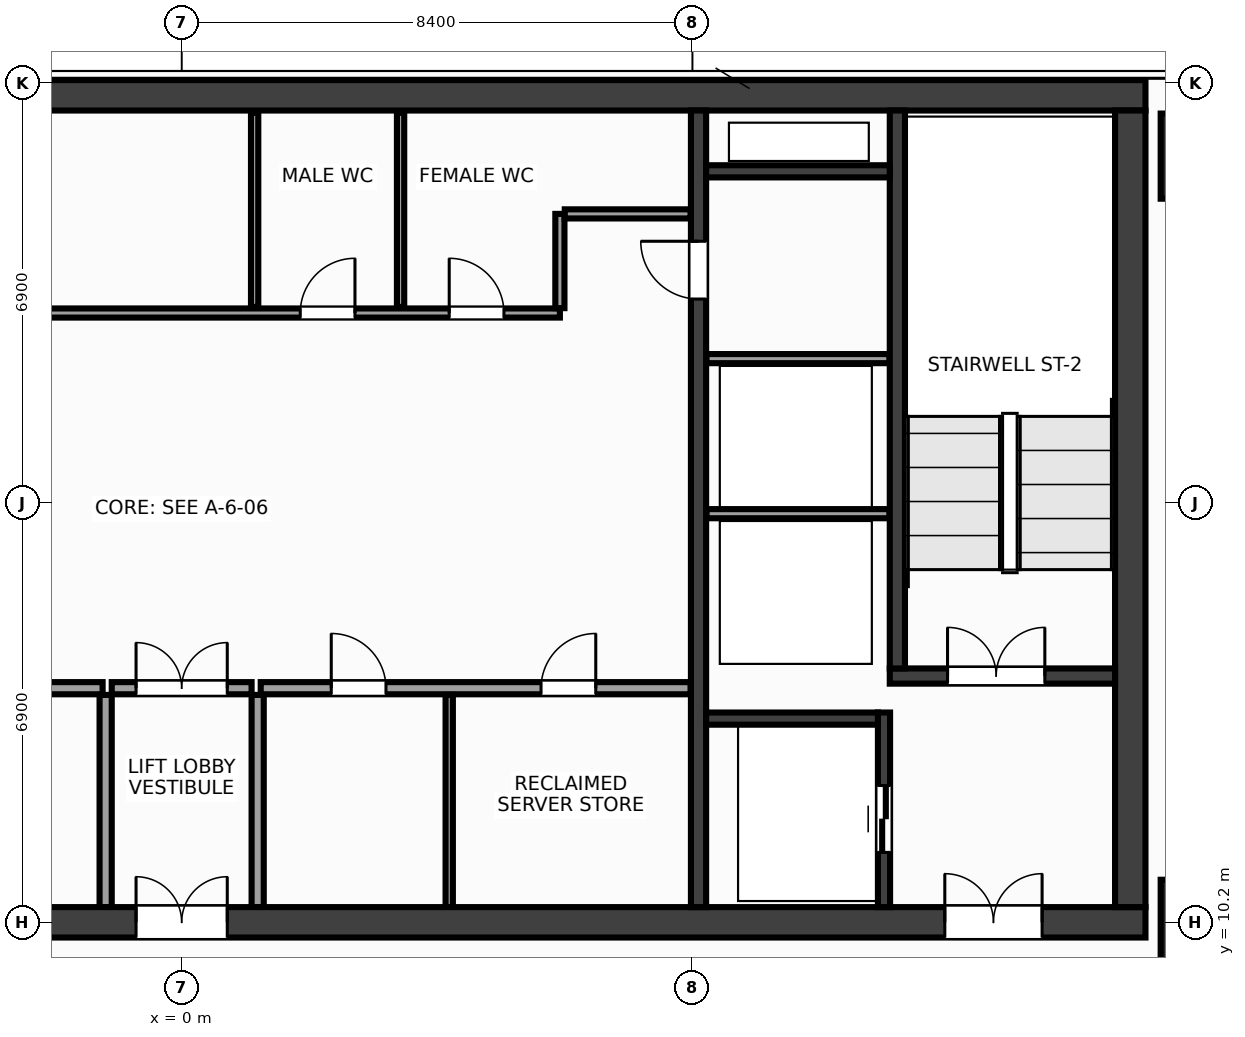
"""IFC4 building model, lengths in metres.
Left out: names, types, materials, properties, quantities, classifications, styles, units other than length and angle.
Written with IfcOpenShell. Run it as: python <this file> out.ifc"""

import sys

from ifc_helpers import new_model, si_unit, direction, frame, frame_2d, origin, origin_2d, place, context, subcontext, project, spatial, rectangle, extrude, source, transform, mapped, element, fill, save


model = new_model("IFC4")
c1 = context("Model", 3, precision=1e-05, world=origin(), true_north=direction((0.0, 1.0)))
c2 = subcontext(c1, "Body", "Model", "MODEL_VIEW")
j1 = project(units=[si_unit("LENGTHUNIT", "METRE"), si_unit("PLANEANGLEUNIT", "RADIAN")], contexts=[c1])
p1 = place(None, origin())
s1 = spatial("IfcSite", under=j1, at=p1, CompositionType="ELEMENT")
p2 = place(p1, origin())
s2 = spatial("IfcBuilding", under=s1, at=p2, CompositionType="ELEMENT")
p3 = place(p2, frame((0.0, 0.0, 243.2)))
s3 = spatial("IfcBuildingStorey", under=s2, at=p3, CompositionType="ELEMENT", Elevation=243.2)
m1 = source(origin(), c2, "Body", "SweptSolid", [
    extrude(rectangle(XDim=31.7, YDim=0.5, at=frame_2d((15.85, 0.0))), origin(), (0.0, 0.0, 1.0), 3.6),
])
p4 = place(p3, frame((-15.85, 23.8, 0.0), z_axis=(0.0, 0.0, 1.0), x_axis=(1.0, 0.0, 0.0)))
e1 = element("IfcWall", 1, at=p4, inside=s3, PredefinedType="SHEAR", context=c2, shape_type="MappedRepresentation", body=[
    mapped(m1, transform((0.0, 0.0, 0.0), x_axis=(1.0, 0.0, 0.0), y_axis=(0.0, 1.0, 0.0), z_axis=(0.0, 0.0, 1.0), scale=1.0)),
])
p5 = place(p3, frame((-15.85, 10.2, 0.0), z_axis=(0.0, 0.0, 1.0), x_axis=(1.0, 0.0, 0.0)))
e2 = element("IfcWall", 2, at=p5, inside=s3, PredefinedType="SHEAR", context=c2, shape_type="MappedRepresentation", body=[
    mapped(m1, transform((0.0, 0.0, 0.0), x_axis=(1.0, 0.0, 0.0), y_axis=(0.0, 1.0, 0.0), z_axis=(0.0, 0.0, 1.0), scale=1.0)),
])
p6 = place(p5, frame((1.7, 0.0, 0.0)))
e3 = element("IfcOpeningElement", 3, at=p6, cuts=e2, PredefinedType="OPENING", context=c2, shape_type="SweptSolid", body=[
    extrude(rectangle(XDim=1.6, YDim=2.15, at=frame_2d((0.8, 1.075))), frame((0.0, 0.262, 0.0), z_axis=(0.0, -1.0, 0.0), x_axis=(1.0, 0.0, 0.0)), (0.0, 0.0, 1.0), 0.524),
])
p7 = place(p5, frame((28.4, 0.0, 0.0)))
e4 = element("IfcOpeningElement", 4, at=p7, cuts=e2, PredefinedType="OPENING", context=c2, shape_type="SweptSolid", body=[
    extrude(rectangle(XDim=1.6, YDim=2.15, at=frame_2d((0.8, 1.075))), frame((0.0, 0.262, 0.0), z_axis=(0.0, -1.0, 0.0), x_axis=(1.0, 0.0, 0.0)), (0.0, 0.0, 1.0), 0.524),
])
p8 = place(p5, frame((15.1, 0.0, 0.0)))
e5 = element("IfcOpeningElement", 5, at=p8, cuts=e2, PredefinedType="OPENING", context=c2, shape_type="SweptSolid", body=[
    extrude(rectangle(XDim=1.5, YDim=2.2, at=frame_2d((0.75, 1.1))), frame((0.0, 0.262, 0.0), z_axis=(0.0, -1.0, 0.0), x_axis=(1.0, 0.0, 0.0)), (0.0, 0.0, 1.0), 0.524),
])
m2 = source(origin(), c2, "Body", "SweptSolid", [
    extrude(rectangle(XDim=13.1, YDim=0.5, at=frame_2d((6.55, 0.0))), origin(), (0.0, 0.0, 1.0), 3.6),
])
p9 = place(p3, frame((15.6, 10.45, 0.0), z_axis=(0.0, 0.0, 1.0), x_axis=(0.0, 1.0, 0.0)))
e6 = element("IfcWall", 6, at=p9, inside=s3, PredefinedType="SHEAR", context=c2, shape_type="MappedRepresentation", body=[
    mapped(m2, transform((0.0, 0.0, 0.0), x_axis=(1.0, 0.0, 0.0), y_axis=(0.0, 1.0, 0.0), z_axis=(0.0, 0.0, 1.0), scale=1.0)),
])
m3 = source(origin(), c2, "Body", "SweptSolid", [
    extrude(rectangle(XDim=13.1, YDim=0.25, at=frame_2d((6.55, 0.0))), origin(), (0.0, 0.0, 1.0), 3.6),
])
p10 = place(p3, frame((8.5, 10.45, 0.0), z_axis=(0.0, 0.0, 1.0), x_axis=(0.0, 1.0, 0.0)))
e7 = element("IfcWall", 7, at=p10, inside=s3, PredefinedType="SHEAR", context=c2, shape_type="MappedRepresentation", body=[
    mapped(m3, transform((0.0, 0.0, 0.0), x_axis=(1.0, 0.0, 0.0), y_axis=(0.0, 1.0, 0.0), z_axis=(0.0, 0.0, 1.0), scale=1.0)),
])
p11 = place(p10, frame((10.0, 0.0, 0.0)))
e8 = element("IfcOpeningElement", 8, at=p11, cuts=e7, PredefinedType="OPENING", context=c2, shape_type="SweptSolid", body=[
    extrude(rectangle(XDim=0.95, YDim=2.15, at=frame_2d((0.475, 1.075))), frame((0.0, 0.137, 0.0), z_axis=(0.0, -1.0, 0.0), x_axis=(1.0, 0.0, 0.0)), (0.0, 0.0, 1.0), 0.274),
])
m4 = source(origin(), c2, "Body", "SweptSolid", [
    extrude(rectangle(XDim=3.705, YDim=0.25, at=frame_2d((1.853, 0.0))), origin(), (0.0, 0.0, 1.0), 3.6),
])
p12 = place(p3, frame((11.645, 14.25, 0.0), z_axis=(0.0, 0.0, 1.0), x_axis=(1.0, 0.0, 0.0)))
e9 = element("IfcWall", 9, at=p12, inside=s3, PredefinedType="SHEAR", context=c2, shape_type="MappedRepresentation", body=[
    mapped(m4, transform((0.0, 0.0, 0.0), x_axis=(1.0, 0.0, 0.0), y_axis=(0.0, 1.0, 0.0), z_axis=(0.0, 0.0, 1.0), scale=1.0)),
])
p13 = place(p12, frame((0.95, 0.0, 0.0)))
e10 = element("IfcOpeningElement", 10, at=p13, cuts=e9, PredefinedType="OPENING", context=c2, shape_type="SweptSolid", body=[
    extrude(rectangle(XDim=1.6, YDim=2.15, at=frame_2d((0.8, 1.075))), frame((0.0, 0.137, 0.0), z_axis=(0.0, -1.0, 0.0), x_axis=(1.0, 0.0, 0.0)), (0.0, 0.0, 1.0), 0.274),
])
m5 = source(origin(), c2, "Body", "SweptSolid", [
    extrude(rectangle(XDim=9.175, YDim=0.25, at=frame_2d((4.587, 0.0))), origin(), (0.0, 0.0, 1.0), 3.6),
])
p14 = place(p3, frame((11.77, 14.375, 0.0), z_axis=(0.0, 0.0, 1.0), x_axis=(0.0, 1.0, 0.0)))
e11 = element("IfcWall", 11, at=p14, inside=s3, PredefinedType="SHEAR", context=c2, shape_type="MappedRepresentation", body=[
    mapped(m5, transform((0.0, 0.0, 0.0), x_axis=(1.0, 0.0, 0.0), y_axis=(0.0, 1.0, 0.0), z_axis=(0.0, 0.0, 1.0), scale=1.0)),
])
m6 = source(origin(), c2, "Body", "SweptSolid", [
    extrude(rectangle(XDim=3.2, YDim=0.2, at=frame_2d((1.6, 0.0))), origin(), (0.0, 0.0, 1.0), 3.6),
])
p15 = place(p3, frame((11.55, 10.45, 0.0), z_axis=(0.0, 0.0, 1.0), x_axis=(0.0, 1.0, 0.0)))
e12 = element("IfcWall", 12, at=p15, inside=s3, PredefinedType="SHEAR", context=c2, shape_type="MappedRepresentation", body=[
    mapped(m6, transform((0.0, 0.0, 0.0), x_axis=(1.0, 0.0, 0.0), y_axis=(0.0, 1.0, 0.0), z_axis=(0.0, 0.0, 1.0), scale=1.0)),
])
p16 = place(p15, frame((0.9, 0.0, 0.0)))
e13 = element("IfcOpeningElement", 13, at=p16, cuts=e12, PredefinedType="OPENING", context=c2, shape_type="SweptSolid", body=[
    extrude(rectangle(XDim=1.1, YDim=2.15, at=frame_2d((0.55, 1.075))), frame((0.0, 0.112, 0.0), z_axis=(0.0, -1.0, 0.0), x_axis=(1.0, 0.0, 0.0)), (0.0, 0.0, 1.0), 0.224),
])
m7 = source(origin(), c2, "Body", "SweptSolid", [
    extrude(rectangle(XDim=2.825, YDim=0.2, at=frame_2d((1.413, 0.0))), origin(), (0.0, 0.0, 1.0), 3.6),
])
p17 = place(p3, frame((8.625, 13.55, 0.0), z_axis=(0.0, 0.0, 1.0), x_axis=(1.0, 0.0, 0.0)))
e14 = element("IfcWall", 14, at=p17, inside=s3, PredefinedType="SHEAR", context=c2, shape_type="MappedRepresentation", body=[
    mapped(m7, transform((0.0, 0.0, 0.0), x_axis=(1.0, 0.0, 0.0), y_axis=(0.0, 1.0, 0.0), z_axis=(0.0, 0.0, 1.0), scale=1.0)),
])
m8 = source(origin(), c2, "Body", "SweptSolid", [
    extrude(rectangle(XDim=3.02, YDim=0.2, at=frame_2d((1.51, 0.0))), origin(), (0.0, 0.0, 1.0), 3.6),
])
p18 = place(p3, frame((8.625, 22.55, 0.0), z_axis=(0.0, 0.0, 1.0), x_axis=(1.0, 0.0, 0.0)))
e15 = element("IfcWall", 15, at=p18, inside=s3, PredefinedType="SHEAR", context=c2, shape_type="MappedRepresentation", body=[
    mapped(m8, transform((0.0, 0.0, 0.0), x_axis=(1.0, 0.0, 0.0), y_axis=(0.0, 1.0, 0.0), z_axis=(0.0, 0.0, 1.0), scale=1.0)),
])
m9 = source(origin(), c2, "Body", "SweptSolid", [
    extrude(rectangle(XDim=1.4, YDim=1.4, at=origin_2d()), origin(), (0.0, 0.0, 1.0), 3.6),
])
for number, where, z_axis, x_axis in (
    (16, (16.8, 10.2, 0.0), (0.0, 0.0, 1.0), (1.0, 0.0, 0.0)),
    (17, (16.8, 22.8, 0.0), (0.0, 0.0, 1.0), (1.0, 0.0, 0.0)),
):
    element("IfcColumn", number, at=place(p3, frame(where, z_axis=z_axis, x_axis=x_axis)), inside=s3, PredefinedType="COLUMN", context=c2, shape_type="MappedRepresentation", body=[
        mapped(m9, transform((0.0, 0.0, 0.0), x_axis=(1.0, 0.0, 0.0), y_axis=(0.0, 1.0, 0.0), z_axis=(0.0, 0.0, 1.0), scale=1.0)),
    ])
m10 = source(origin(), c2, "Body", "SweptSolid", [
    extrude(rectangle(XDim=3.01, YDim=0.15, at=frame_2d((1.505, 0.0))), origin(), (0.0, 0.0, 1.0), 3.37),
])
for number, where, z_axis, x_axis in (
    (18, (8.63, 16.92, 0.0), (0.0, 0.0, 1.0), (1.0, 0.0, 0.0)),
    (19, (8.63, 19.47, 0.0), (0.0, 0.0, 1.0), (1.0, 0.0, 0.0)),
):
    element("IfcWall", number, at=place(p3, frame(where, z_axis=z_axis, x_axis=x_axis)), inside=s3, PredefinedType="PARTITIONING", context=c2, shape_type="MappedRepresentation", body=[
        mapped(m10, transform((0.0, 0.0, 0.0), x_axis=(1.0, 0.0, 0.0), y_axis=(0.0, 1.0, 0.0), z_axis=(0.0, 0.0, 1.0), scale=1.0)),
    ])
m11 = source(origin(), c2, "Body", "SweptSolid", [
    extrude(rectangle(XDim=7.07, YDim=0.2, at=frame_2d((3.535, 0.0))), origin(), (0.0, 0.0, 1.0), 3.37),
])
p19 = place(p3, frame((-8.37, 14.05, 0.0), z_axis=(0.0, 0.0, 1.0), x_axis=(1.0, 0.0, 0.0)))
e20 = element("IfcWall", 20, at=p19, inside=s3, PredefinedType="PARTITIONING", context=c2, shape_type="MappedRepresentation", body=[
    mapped(m11, transform((0.0, 0.0, 0.0), x_axis=(1.0, 0.0, 0.0), y_axis=(0.0, 1.0, 0.0), z_axis=(0.0, 0.0, 1.0), scale=1.0)),
])
p20 = place(p19, frame((2.8, 0.0, 0.0)))
e21 = element("IfcOpeningElement", 21, at=p20, cuts=e20, PredefinedType="OPENING", context=c2, shape_type="SweptSolid", body=[
    extrude(rectangle(XDim=0.98, YDim=2.15, at=frame_2d((0.49, 1.075))), frame((0.0, 0.112, 0.0), z_axis=(0.0, -1.0, 0.0), x_axis=(1.0, 0.0, 0.0)), (0.0, 0.0, 1.0), 0.224),
])
p21 = place(p3, frame((1.3, 14.05, 0.0), z_axis=(0.0, 0.0, 1.0), x_axis=(1.0, 0.0, 0.0)))
e22 = element("IfcWall", 22, at=p21, inside=s3, PredefinedType="PARTITIONING", context=c2, shape_type="MappedRepresentation", body=[
    mapped(m11, transform((0.0, 0.0, 0.0), x_axis=(1.0, 0.0, 0.0), y_axis=(0.0, 1.0, 0.0), z_axis=(0.0, 0.0, 1.0), scale=1.0)),
])
p22 = place(p21, frame((1.16, 0.0, 0.0)))
e23 = element("IfcOpeningElement", 23, at=p22, cuts=e22, PredefinedType="OPENING", context=c2, shape_type="SweptSolid", body=[
    extrude(rectangle(XDim=0.9, YDim=2.15, at=frame_2d((0.45, 1.075))), frame((0.0, 0.112, 0.0), z_axis=(0.0, -1.0, 0.0), x_axis=(1.0, 0.0, 0.0)), (0.0, 0.0, 1.0), 0.224),
])
p23 = place(p21, frame((4.61, 0.0, 0.0)))
e24 = element("IfcOpeningElement", 24, at=p23, cuts=e22, PredefinedType="OPENING", context=c2, shape_type="SweptSolid", body=[
    extrude(rectangle(XDim=0.9, YDim=2.15, at=frame_2d((0.45, 1.075))), frame((0.0, 0.112, 0.0), z_axis=(0.0, -1.0, 0.0), x_axis=(1.0, 0.0, 0.0)), (0.0, 0.0, 1.0), 0.224),
])
m12 = source(origin(), c2, "Body", "SweptSolid", [
    extrude(rectangle(XDim=3.49, YDim=0.2, at=frame_2d((1.745, 0.0))), origin(), (0.0, 0.0, 1.0), 3.37),
])
for number, where, z_axis, x_axis in (
    (25, (-1.25, 10.45, 0.0), (0.0, 0.0, 1.0), (0.0, 1.0, 0.0)),
    (26, (1.25, 10.45, 0.0), (0.0, 0.0, 1.0), (0.0, 1.0, 0.0)),
):
    element("IfcWall", number, at=place(p3, frame(where, z_axis=z_axis, x_axis=x_axis)), inside=s3, PredefinedType="PARTITIONING", context=c2, shape_type="MappedRepresentation", body=[
        mapped(m12, transform((0.0, 0.0, 0.0), x_axis=(1.0, 0.0, 0.0), y_axis=(0.0, 1.0, 0.0), z_axis=(0.0, 0.0, 1.0), scale=1.0)),
    ])
m13 = source(origin(), c2, "Body", "SweptSolid", [
    extrude(rectangle(XDim=2.3, YDim=0.2, at=frame_2d((1.15, 0.0))), origin(), (0.0, 0.0, 1.0), 3.37),
])
p24 = place(p3, frame((-1.15, 14.05, 0.0), z_axis=(0.0, 0.0, 1.0), x_axis=(1.0, 0.0, 0.0)))
e27 = element("IfcWall", 27, at=p24, inside=s3, PredefinedType="PARTITIONING", context=c2, shape_type="MappedRepresentation", body=[
    mapped(m13, transform((0.0, 0.0, 0.0), x_axis=(1.0, 0.0, 0.0), y_axis=(0.0, 1.0, 0.0), z_axis=(0.0, 0.0, 1.0), scale=1.0)),
])
p25 = place(p24, frame((0.4, 0.0, 0.0)))
e28 = element("IfcOpeningElement", 28, at=p25, cuts=e27, PredefinedType="OPENING", context=c2, shape_type="SweptSolid", body=[
    extrude(rectangle(XDim=1.5, YDim=2.2, at=frame_2d((0.75, 1.1))), frame((0.0, 0.112, 0.0), z_axis=(0.0, -1.0, 0.0), x_axis=(1.0, 0.0, 0.0)), (0.0, 0.0, 1.0), 0.224),
])
m14 = source(origin(), c2, "Body", "SweptSolid", [
    extrude(rectangle(XDim=14.59, YDim=0.15, at=frame_2d((7.295, 0.0))), origin(), (0.0, 0.0, 1.0), 3.37),
])
p26 = place(p3, frame((-8.37, 20.22, 0.0), z_axis=(0.0, 0.0, 1.0), x_axis=(1.0, 0.0, 0.0)))
e29 = element("IfcWall", 29, at=p26, inside=s3, PredefinedType="PARTITIONING", context=c2, shape_type="MappedRepresentation", body=[
    mapped(m14, transform((0.0, 0.0, 0.0), x_axis=(1.0, 0.0, 0.0), y_axis=(0.0, 1.0, 0.0), z_axis=(0.0, 0.0, 1.0), scale=1.0)),
])
p27 = place(p26, frame((4.36, 0.0, 0.0)))
e30 = element("IfcOpeningElement", 30, at=p27, cuts=e29, PredefinedType="OPENING", context=c2, shape_type="SweptSolid", body=[
    extrude(rectangle(XDim=0.9, YDim=2.15, at=frame_2d((0.45, 1.075))), frame((0.0, 0.087, 0.0), z_axis=(0.0, -1.0, 0.0), x_axis=(1.0, 0.0, 0.0)), (0.0, 0.0, 1.0), 0.174),
])
p28 = place(p26, frame((10.32, 0.0, 0.0)))
e31 = element("IfcOpeningElement", 31, at=p28, cuts=e29, PredefinedType="OPENING", context=c2, shape_type="SweptSolid", body=[
    extrude(rectangle(XDim=0.9, YDim=2.15, at=frame_2d((0.45, 1.075))), frame((0.0, 0.087, 0.0), z_axis=(0.0, -1.0, 0.0), x_axis=(1.0, 0.0, 0.0)), (0.0, 0.0, 1.0), 0.174),
])
p29 = place(p26, frame((12.77, 0.0, 0.0)))
e32 = element("IfcOpeningElement", 32, at=p29, cuts=e29, PredefinedType="OPENING", context=c2, shape_type="SweptSolid", body=[
    extrude(rectangle(XDim=0.9, YDim=2.15, at=frame_2d((0.45, 1.075))), frame((0.0, 0.087, 0.0), z_axis=(0.0, -1.0, 0.0), x_axis=(1.0, 0.0, 0.0)), (0.0, 0.0, 1.0), 0.174),
])
m15 = source(origin(), c2, "Body", "SweptSolid", [
    extrude(rectangle(XDim=1.55, YDim=0.15, at=frame_2d((0.775, 0.0))), origin(), (0.0, 0.0, 1.0), 3.37),
])
p30 = place(p3, frame((6.22, 20.3, 0.0), z_axis=(0.0, 0.0, 1.0), x_axis=(0.0, 1.0, 0.0)))
e33 = element("IfcWall", 33, at=p30, inside=s3, PredefinedType="PARTITIONING", context=c2, shape_type="MappedRepresentation", body=[
    mapped(m15, transform((0.0, 0.0, 0.0), x_axis=(1.0, 0.0, 0.0), y_axis=(0.0, 1.0, 0.0), z_axis=(0.0, 0.0, 1.0), scale=1.0)),
])
m16 = source(origin(), c2, "Body", "SweptSolid", [
    extrude(rectangle(XDim=2.07, YDim=0.15, at=frame_2d((1.035, 0.0))), origin(), (0.0, 0.0, 1.0), 3.37),
])
p31 = place(p3, frame((6.3, 21.85, 0.0), z_axis=(0.0, 0.0, 1.0), x_axis=(1.0, 0.0, 0.0)))
e34 = element("IfcWall", 34, at=p31, inside=s3, PredefinedType="PARTITIONING", context=c2, shape_type="MappedRepresentation", body=[
    mapped(m16, transform((0.0, 0.0, 0.0), x_axis=(1.0, 0.0, 0.0), y_axis=(0.0, 1.0, 0.0), z_axis=(0.0, 0.0, 1.0), scale=1.0)),
])
m17 = source(origin(), c2, "Body", "SweptSolid", [
    extrude(rectangle(XDim=3.49, YDim=0.12, at=frame_2d((1.745, 0.0))), origin(), (0.0, 0.0, 1.0), 3.37),
])
p32 = place(p3, frame((4.4, 10.45, 0.0), z_axis=(0.0, 0.0, 1.0), x_axis=(0.0, 1.0, 0.0)))
e35 = element("IfcWall", 35, at=p32, inside=s3, PredefinedType="PARTITIONING", context=c2, shape_type="MappedRepresentation", body=[
    mapped(m17, transform((0.0, 0.0, 0.0), x_axis=(1.0, 0.0, 0.0), y_axis=(0.0, 1.0, 0.0), z_axis=(0.0, 0.0, 1.0), scale=1.0)),
])
m18 = source(origin(), c2, "Body", "SweptSolid", [
    extrude(rectangle(XDim=3.19, YDim=0.12, at=frame_2d((1.595, 0.0))), origin(), (0.0, 0.0, 1.0), 3.37),
])
for number, where, z_axis, x_axis in (
    (36, (1.2, 20.32, 0.0), (0.0, 0.0, 1.0), (0.0, 1.0, 0.0)),
    (37, (3.6, 20.32, 0.0), (0.0, 0.0, 1.0), (0.0, 1.0, 0.0)),
):
    element("IfcWall", number, at=place(p3, frame(where, z_axis=z_axis, x_axis=x_axis)), inside=s3, PredefinedType="PARTITIONING", context=c2, shape_type="MappedRepresentation", body=[
        mapped(m18, transform((0.0, 0.0, 0.0), x_axis=(1.0, 0.0, 0.0), y_axis=(0.0, 1.0, 0.0), z_axis=(0.0, 0.0, 1.0), scale=1.0)),
    ])
m19 = source(origin(), c2, "Body", "SweptSolid", [
    extrude(rectangle(XDim=1.6, YDim=2.15, at=frame_2d((0.8, 1.075))), frame((0.0, 0.025, 0.0), z_axis=(0.0, -1.0, 0.0), x_axis=(1.0, 0.0, 0.0)), (0.0, 0.0, 1.0), 0.05),
])
p33 = place(p13, origin())
e38 = element("IfcDoor", 38, at=p33, inside=s3, OperationType="DOUBLE_DOOR_SINGLE_SWING", PredefinedType="DOOR", context=c2, shape_type="MappedRepresentation", body=[
    mapped(m19, transform((0.0, 0.0, 0.0), x_axis=(1.0, 0.0, 0.0), y_axis=(0.0, 1.0, 0.0), z_axis=(0.0, 0.0, 1.0), scale=1.0)),
])
fill(e10, e38)
p34 = place(p7, origin())
e39 = element("IfcDoor", 39, at=p34, inside=s3, OperationType="DOUBLE_DOOR_SINGLE_SWING", PredefinedType="DOOR", context=c2, shape_type="MappedRepresentation", body=[
    mapped(m19, transform((0.0, 0.0, 0.0), x_axis=(1.0, 0.0, 0.0), y_axis=(0.0, 1.0, 0.0), z_axis=(0.0, 0.0, 1.0), scale=1.0)),
])
fill(e4, e39)
m20 = source(origin(), c2, "Body", "SweptSolid", [
    extrude(rectangle(XDim=1.1, YDim=2.15, at=frame_2d((0.55, 1.075))), frame((0.0, 0.025, 0.0), z_axis=(0.0, -1.0, 0.0), x_axis=(1.0, 0.0, 0.0)), (0.0, 0.0, 1.0), 0.05),
])
p35 = place(p16, origin())
e40 = element("IfcDoor", 40, at=p35, inside=s3, OperationType="DOUBLE_DOOR_SLIDING", PredefinedType="DOOR", context=c2, shape_type="MappedRepresentation", body=[
    mapped(m20, transform((0.0, 0.0, 0.0), x_axis=(1.0, 0.0, 0.0), y_axis=(0.0, 1.0, 0.0), z_axis=(0.0, 0.0, 1.0), scale=1.0)),
])
fill(e13, e40)
m21 = source(origin(), c2, "Body", "SweptSolid", [
    extrude(rectangle(XDim=0.95, YDim=2.15, at=frame_2d((0.475, 1.075))), frame((0.0, 0.025, 0.0), z_axis=(0.0, -1.0, 0.0), x_axis=(1.0, 0.0, 0.0)), (0.0, 0.0, 1.0), 0.05),
])
p36 = place(p11, origin())
e41 = element("IfcDoor", 41, at=p36, inside=s3, OperationType="SINGLE_SWING_RIGHT", PredefinedType="DOOR", context=c2, shape_type="MappedRepresentation", body=[
    mapped(m21, transform((0.0, 0.0, 0.0), x_axis=(1.0, 0.0, 0.0), y_axis=(0.0, 1.0, 0.0), z_axis=(0.0, 0.0, 1.0), scale=1.0)),
])
fill(e8, e41)
m22 = source(origin(), c2, "Body", "SweptSolid", [
    extrude(rectangle(XDim=0.9, YDim=2.15, at=frame_2d((0.45, 1.075))), frame((0.0, 0.025, 0.0), z_axis=(0.0, -1.0, 0.0), x_axis=(1.0, 0.0, 0.0)), (0.0, 0.0, 1.0), 0.05),
])
p37 = place(p22, origin())
e42 = element("IfcDoor", 42, at=p37, inside=s3, OperationType="SINGLE_SWING_LEFT", PredefinedType="DOOR", context=c2, shape_type="MappedRepresentation", body=[
    mapped(m22, transform((0.0, 0.0, 0.0), x_axis=(1.0, 0.0, 0.0), y_axis=(0.0, 1.0, 0.0), z_axis=(0.0, 0.0, 1.0), scale=1.0)),
])
fill(e23, e42)
p38 = place(p23, origin())
e43 = element("IfcDoor", 43, at=p38, inside=s3, OperationType="SINGLE_SWING_RIGHT", PredefinedType="DOOR", context=c2, shape_type="MappedRepresentation", body=[
    mapped(m22, transform((0.0, 0.0, 0.0), x_axis=(1.0, 0.0, 0.0), y_axis=(0.0, 1.0, 0.0), z_axis=(0.0, 0.0, 1.0), scale=1.0)),
])
fill(e24, e43)
m23 = source(origin(), c2, "Body", "SweptSolid", [
    extrude(rectangle(XDim=1.5, YDim=2.2, at=frame_2d((0.75, 1.1))), frame((0.0, 0.025, 0.0), z_axis=(0.0, -1.0, 0.0), x_axis=(1.0, 0.0, 0.0)), (0.0, 0.0, 1.0), 0.05),
])
p39 = place(p25, origin())
e44 = element("IfcDoor", 44, at=p39, inside=s3, OperationType="DOUBLE_DOOR_SINGLE_SWING", PredefinedType="DOOR", context=c2, shape_type="MappedRepresentation", body=[
    mapped(m23, transform((0.0, 0.0, 0.0), x_axis=(1.0, 0.0, 0.0), y_axis=(0.0, 1.0, 0.0), z_axis=(0.0, 0.0, 1.0), scale=1.0)),
])
fill(e28, e44)
p40 = place(p8, origin())
e45 = element("IfcDoor", 45, at=p40, inside=s3, OperationType="DOUBLE_DOOR_SINGLE_SWING", PredefinedType="DOOR", context=c2, shape_type="MappedRepresentation", body=[
    mapped(m23, transform((0.0, 0.0, 0.0), x_axis=(1.0, 0.0, 0.0), y_axis=(0.0, 1.0, 0.0), z_axis=(0.0, 0.0, 1.0), scale=1.0)),
])
fill(e5, e45)
p41 = place(p28, origin())
e46 = element("IfcDoor", 46, at=p41, inside=s3, OperationType="SINGLE_SWING_RIGHT", PredefinedType="DOOR", context=c2, shape_type="MappedRepresentation", body=[
    mapped(m22, transform((0.0, 0.0, 0.0), x_axis=(1.0, 0.0, 0.0), y_axis=(0.0, 1.0, 0.0), z_axis=(0.0, 0.0, 1.0), scale=1.0)),
])
fill(e31, e46)
p42 = place(p29, origin())
e47 = element("IfcDoor", 47, at=p42, inside=s3, OperationType="SINGLE_SWING_LEFT", PredefinedType="DOOR", context=c2, shape_type="MappedRepresentation", body=[
    mapped(m22, transform((0.0, 0.0, 0.0), x_axis=(1.0, 0.0, 0.0), y_axis=(0.0, 1.0, 0.0), z_axis=(0.0, 0.0, 1.0), scale=1.0)),
])
fill(e32, e47)
save(model, sys.argv[1])
